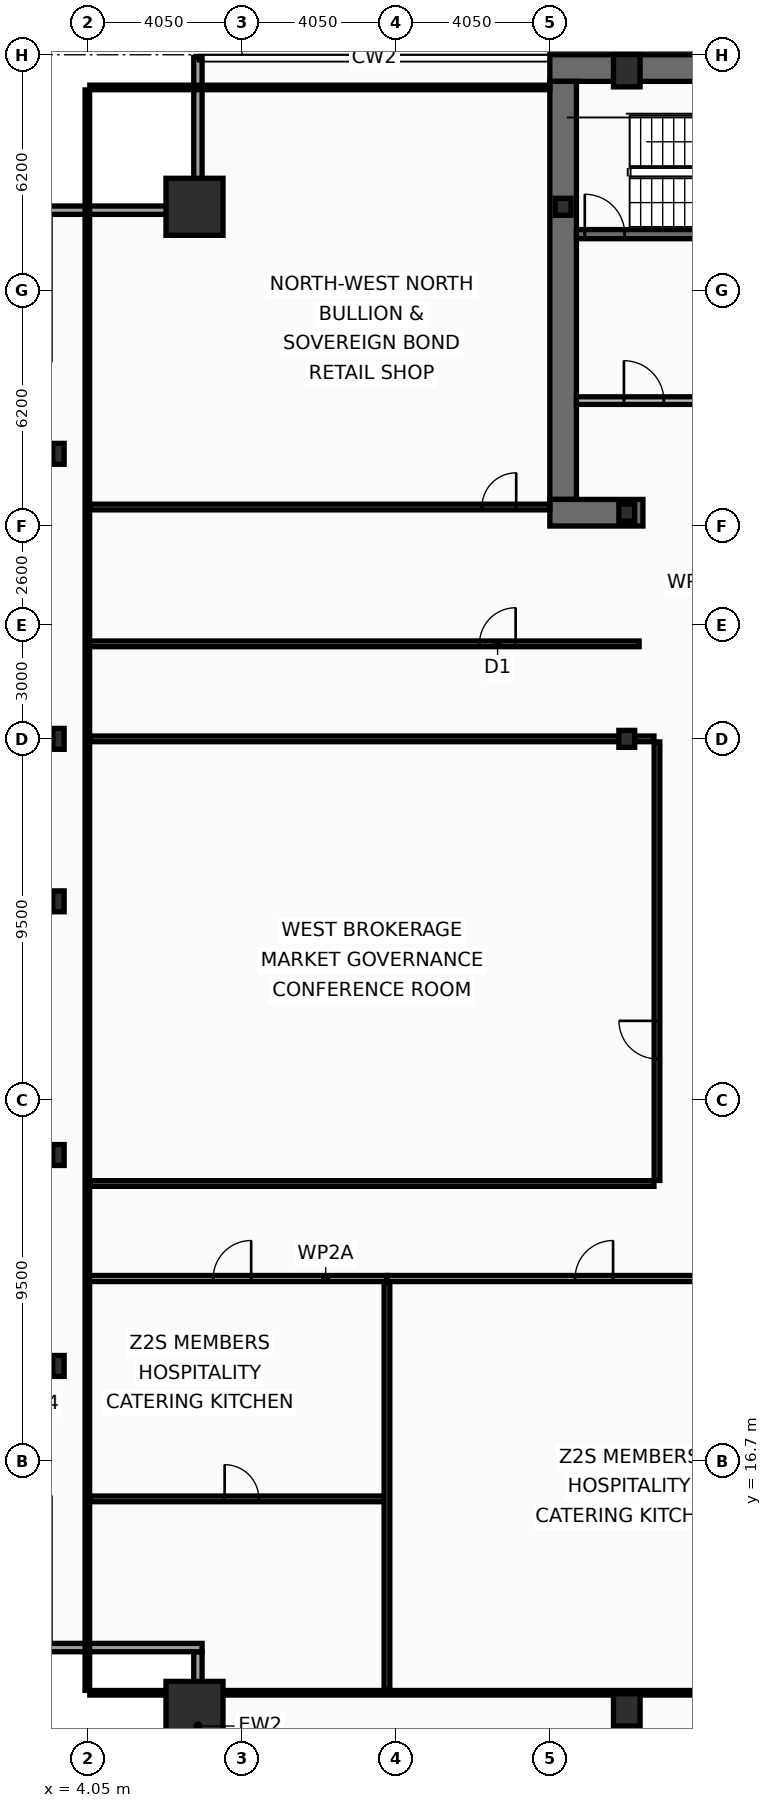
"""IFC4 building model, lengths in metres.
Left out: names, types, materials, properties, quantities, classifications, styles, units other than length and angle.
Written with IfcOpenShell. Run it as: python <this file> out.ifc"""

import sys

from ifc_helpers import new_model, si_unit, direction, frame, frame_2d, origin, origin_2d, place, context, subcontext, project, spatial, rectangle, hollow_rectangle, i_section, extrude, element, fill, save


model = new_model("IFC4")
c1 = context("Model", 3, precision=1e-05, world=origin(), true_north=direction((0.0, 1.0)))
c2 = subcontext(c1, "Body", "Model", "MODEL_VIEW")
j1 = project(units=[si_unit("LENGTHUNIT", "METRE"), si_unit("PLANEANGLEUNIT", "RADIAN")], contexts=[c1])
p1 = place(None, origin())
s1 = spatial("IfcSite", under=j1, at=p1, CompositionType="ELEMENT")
p2 = place(p1, origin())
s2 = spatial("IfcBuilding", under=s1, at=p2, CompositionType="ELEMENT")
p3 = place(p2, frame((0.0, 0.0, 129.0)))
s3 = spatial("IfcBuildingStorey", under=s2, at=p3, CompositionType="ELEMENT", Elevation=129.0)
p4 = place(p3, frame((16.2, 53.35, 0.0), z_axis=(0.0, 0.0, 1.0), x_axis=(1.0, 0.0, 0.0)))
e1 = element("IfcWall", 1, at=p4, inside=s3, PredefinedType="SHEAR", context=c2, shape_type="SweptSolid", body=[
    extrude(rectangle(XDim=40.5, YDim=0.7, at=frame_2d((20.25, 0.0))), origin(), (0.0, 0.0, 1.0), 3.44),
])
p5 = place(p3, frame((16.55, 42.0, 0.0), z_axis=(0.0, 0.0, 1.0), x_axis=(0.0, 1.0, 0.0)))
e2 = element("IfcWall", 2, at=p5, inside=s3, PredefinedType="SHEAR", context=c2, shape_type="SweptSolid", body=[
    extrude(rectangle(XDim=11.0, YDim=0.7, at=frame_2d((5.5, 0.0))), origin(), (0.0, 0.0, 1.0), 3.44),
])
p6 = place(p3, frame((18.65, 41.65, 0.0), z_axis=(0.0, 0.0, 1.0), x_axis=(-1.0, 0.0, 0.0)))
e3 = element("IfcWall", 3, at=p6, inside=s3, PredefinedType="SHEAR", context=c2, shape_type="SweptSolid", body=[
    extrude(rectangle(XDim=2.45, YDim=0.7, at=frame_2d((1.225, 0.0))), origin(), (0.0, 0.0, 1.0), 3.44),
])
p7 = place(p3, frame((16.9, 48.98, 0.0), z_axis=(0.0, 0.0, 1.0), x_axis=(1.0, 0.0, 0.0)))
e4 = element("IfcWall", 4, at=p7, inside=s3, PredefinedType="SHEAR", context=c2, shape_type="SweptSolid", body=[
    extrude(rectangle(XDim=7.32, YDim=0.24, at=frame_2d((3.66, 0.0))), origin(), (0.0, 0.0, 1.0), 3.44),
])
p8 = place(p7, frame((0.22, 0.0, 0.0)))
e5 = element("IfcOpeningElement", 5, at=p8, cuts=e4, PredefinedType="OPENING", context=c2, shape_type="SweptSolid", body=[
    extrude(rectangle(XDim=1.05, YDim=2.15, at=frame_2d((0.525, 1.075))), frame((0.0, 0.13, 0.0), z_axis=(0.0, -1.0, 0.0), x_axis=(1.0, 0.0, 0.0)), (0.0, 0.0, 1.0), 0.26),
])
for number, where, z_axis, x_axis in (
    (6, (6.85, 10.15, 0.0), (0.0, 0.0, 1.0), (1.0, 0.0, 0.0)),
    (7, (6.85, 49.7, 0.0), (0.0, 0.0, 1.0), (1.0, 0.0, 0.0)),
):
    element("IfcColumn", number, at=place(p3, frame(where, z_axis=z_axis, x_axis=x_axis)), inside=s3, PredefinedType="COLUMN", context=c2, shape_type="SweptSolid", body=[
        extrude(hollow_rectangle(XDim=1.5, YDim=1.5, WallThickness=0.07, at=origin_2d()), origin(), (0.0, 0.0, 1.0), 3.6),
    ])
for number, where, z_axis, x_axis in (
    (8, (18.225, 10.15, 0.0), (0.0, 0.0, 1.0), (1.0, 0.0, 0.0)),
    (9, (18.225, 53.28, 0.0), (0.0, 0.0, 1.0), (1.0, 0.0, 0.0)),
):
    element("IfcColumn", number, at=place(p3, frame(where, z_axis=z_axis, x_axis=x_axis)), inside=s3, PredefinedType="COLUMN", context=c2, shape_type="SweptSolid", body=[
        extrude(hollow_rectangle(XDim=0.7, YDim=0.85, WallThickness=0.05, at=origin_2d()), origin(), (0.0, 0.0, 1.0), 3.6),
    ])
for number, where, z_axis, x_axis in (
    (10, (3.27, 19.2, 0.0), (0.0, 0.0, 1.0), (1.0, 0.0, 0.0)),
    (11, (3.27, 24.75, 0.0), (0.0, 0.0, 1.0), (1.0, 0.0, 0.0)),
    (12, (3.27, 31.425, 0.0), (0.0, 0.0, 1.0), (1.0, 0.0, 0.0)),
    (13, (3.27, 35.7, 0.0), (0.0, 0.0, 1.0), (1.0, 0.0, 0.0)),
    (14, (3.27, 43.2, 0.0), (0.0, 0.0, 1.0), (1.0, 0.0, 0.0)),
):
    element("IfcColumn", number, at=place(p3, frame(where, z_axis=z_axis, x_axis=x_axis)), inside=s3, PredefinedType="COLUMN", context=c2, shape_type="SweptSolid", body=[
        extrude(i_section(OverallWidth=0.3, OverallDepth=0.55, WebThickness=0.015, FlangeThickness=0.029, at=origin_2d()), origin(), (0.0, 0.0, 1.0), 3.6),
    ])
for number, where, z_axis, x_axis in (
    (15, (16.55, 49.7, 0.0), (0.0, 0.0, 1.0), (1.0, 0.0, 0.0)),
    (16, (18.225, 35.7, 0.0), (0.0, 0.0, 1.0), (1.0, 0.0, 0.0)),
    (17, (18.225, 41.65, 0.0), (0.0, 0.0, 1.0), (1.0, 0.0, 0.0)),
):
    element("IfcColumn", number, at=place(p3, frame(where, z_axis=z_axis, x_axis=x_axis)), inside=s3, PredefinedType="COLUMN", context=c2, shape_type="SweptSolid", body=[
        extrude(i_section(OverallWidth=0.416, OverallDepth=0.446, WebThickness=0.039, FlangeThickness=0.063, at=origin_2d()), origin(), (0.0, 0.0, 1.0), 3.6),
    ])
p9 = place(p3, frame((6.94, 7.77, 0.0), z_axis=(0.0, 0.0, 1.0), x_axis=(0.0, 1.0, 0.0)))
e18 = element("IfcWall", 18, at=p9, inside=s3, PredefinedType="SOLIDWALL", context=c2, shape_type="SweptSolid", body=[
    extrude(rectangle(XDim=3.91, YDim=0.22, at=frame_2d((1.955, 0.0))), origin(), (0.0, 0.0, 1.0), 2.83),
])
for number, where, z_axis, x_axis in (
    (19, (7.05, 11.79, 0.0), (0.0, 0.0, 1.0), (-1.0, 0.0, 0.0)),
    (20, (2.83, 49.61, 0.0), (0.0, 0.0, 1.0), (1.0, 0.0, 0.0)),
):
    element("IfcWall", number, at=place(p3, frame(where, z_axis=z_axis, x_axis=x_axis)), inside=s3, PredefinedType="SOLIDWALL", context=c2, shape_type="SweptSolid", body=[
        extrude(rectangle(XDim=4.22, YDim=0.22, at=frame_2d((2.11, 0.0))), origin(), (0.0, 0.0, 1.0), 2.83),
    ])
p10 = place(p3, frame((6.94, 49.72, 0.0), z_axis=(0.0, 0.0, 1.0), x_axis=(0.0, 1.0, 0.0)))
e21 = element("IfcWall", 21, at=p10, inside=s3, PredefinedType="SOLIDWALL", context=c2, shape_type="SweptSolid", body=[
    extrude(rectangle(XDim=3.91, YDim=0.22, at=frame_2d((1.955, 0.0))), origin(), (0.0, 0.0, 1.0), 2.83),
])
p11 = place(p3, frame((16.9, 44.6, 0.0), z_axis=(0.0, 0.0, 1.0), x_axis=(1.0, 0.0, 0.0)))
e22 = element("IfcWall", 22, at=p11, inside=s3, PredefinedType="PARTITIONING", context=c2, shape_type="SweptSolid", body=[
    extrude(rectangle(XDim=4.1, YDim=0.2, at=frame_2d((2.05, 0.0))), origin(), (0.0, 0.0, 1.0), 3.44),
])
p12 = place(p11, frame((1.25, 0.0, 0.0)))
e23 = element("IfcOpeningElement", 23, at=p12, cuts=e22, PredefinedType="OPENING", context=c2, shape_type="SweptSolid", body=[
    extrude(rectangle(XDim=1.05, YDim=2.15, at=frame_2d((0.525, 1.075))), frame((0.0, 0.11, 0.0), z_axis=(0.0, -1.0, 0.0), x_axis=(1.0, 0.0, 0.0)), (0.0, 0.0, 1.0), 0.22),
])
p13 = place(p3, frame((4.03, 38.2, 0.0), z_axis=(0.0, 0.0, 1.0), x_axis=(1.0, 0.0, 0.0)))
e24 = element("IfcWall", 24, at=p13, inside=s3, PredefinedType="PARTITIONING", context=c2, shape_type="SweptSolid", body=[
    extrude(rectangle(XDim=14.52, YDim=0.15, at=frame_2d((7.26, 0.0))), origin(), (0.0, 0.0, 1.0), 2.73),
])
p14 = place(p13, frame((10.32, 0.0, 0.0)))
e25 = element("IfcOpeningElement", 25, at=p14, cuts=e24, PredefinedType="OPENING", context=c2, shape_type="SweptSolid", body=[
    extrude(rectangle(XDim=0.95, YDim=2.05, at=frame_2d((0.475, 1.025))), frame((0.0, 0.085, 0.0), z_axis=(0.0, -1.0, 0.0), x_axis=(1.0, 0.0, 0.0)), (0.0, 0.0, 1.0), 0.17),
])
p15 = place(p3, frame((4.095, 41.8, 0.0), z_axis=(0.0, 0.0, 1.0), x_axis=(1.0, 0.0, 0.0)))
e26 = element("IfcWall", 26, at=p15, inside=s3, PredefinedType="PARTITIONING", context=c2, shape_type="SweptSolid", body=[
    extrude(rectangle(XDim=12.105, YDim=0.15, at=frame_2d((6.052, 0.0))), origin(), (0.0, 0.0, 1.0), 3.44),
])
p16 = place(p15, frame((10.32, 0.0, 0.0)))
e27 = element("IfcOpeningElement", 27, at=p16, cuts=e26, PredefinedType="OPENING", context=c2, shape_type="SweptSolid", body=[
    extrude(rectangle(XDim=0.9, YDim=2.05, at=frame_2d((0.45, 1.025))), frame((0.0, 0.085, 0.0), z_axis=(0.0, -1.0, 0.0), x_axis=(1.0, 0.0, 0.0)), (0.0, 0.0, 1.0), 0.17),
])
p17 = place(p3, frame((4.03, 21.5, 0.0), z_axis=(0.0, 0.0, 1.0), x_axis=(1.0, 0.0, 0.0)))
e28 = element("IfcWall", 28, at=p17, inside=s3, PredefinedType="PARTITIONING", context=c2, shape_type="SweptSolid", body=[
    extrude(rectangle(XDim=7.884, YDim=0.16, at=frame_2d((3.942, 0.0))), origin(), (0.0, 0.0, 1.0), 3.44),
])
p18 = place(p17, frame((3.311, 0.0, 0.0)))
e29 = element("IfcOpeningElement", 29, at=p18, cuts=e28, PredefinedType="OPENING", context=c2, shape_type="SweptSolid", body=[
    extrude(rectangle(XDim=1.0, YDim=2.05, at=frame_2d((0.5, 1.025))), frame((0.0, 0.09, 0.0), z_axis=(0.0, -1.0, 0.0), x_axis=(1.0, 0.0, 0.0)), (0.0, 0.0, 1.0), 0.18),
])
p19 = place(p3, frame((4.095, 15.702, 0.0), z_axis=(0.0, 0.0, 1.0), x_axis=(1.0, 0.0, 0.0)))
e30 = element("IfcWall", 30, at=p19, inside=s3, PredefinedType="PARTITIONING", context=c2, shape_type="SweptSolid", body=[
    extrude(rectangle(XDim=7.739, YDim=0.15, at=frame_2d((3.87, 0.0))), origin(), (0.0, 0.0, 1.0), 2.83),
])
p20 = place(p19, frame((3.548, 0.0, 0.0)))
e31 = element("IfcOpeningElement", 31, at=p20, cuts=e30, PredefinedType="OPENING", context=c2, shape_type="SweptSolid", body=[
    extrude(rectangle(XDim=0.9, YDim=2.05, at=frame_2d((0.45, 1.025))), frame((0.0, 0.085, 0.0), z_axis=(0.0, -1.0, 0.0), x_axis=(1.0, 0.0, 0.0)), (0.0, 0.0, 1.0), 0.17),
])
p21 = place(p3, frame((11.914, 21.5, 0.0), z_axis=(0.0, 0.0, 1.0), x_axis=(1.0, 0.0, 0.0)))
e32 = element("IfcWall", 32, at=p21, inside=s3, PredefinedType="PARTITIONING", context=c2, shape_type="SweptSolid", body=[
    extrude(rectangle(XDim=11.787, YDim=0.16, at=frame_2d((5.893, 0.0))), origin(), (0.0, 0.0, 1.0), 2.73),
])
p22 = place(p21, frame((4.95, 0.0, 0.0)))
e33 = element("IfcOpeningElement", 33, at=p22, cuts=e32, PredefinedType="OPENING", context=c2, shape_type="SweptSolid", body=[
    extrude(rectangle(XDim=1.0, YDim=2.05, at=frame_2d((0.5, 1.025))), frame((0.0, 0.09, 0.0), z_axis=(0.0, -1.0, 0.0), x_axis=(1.0, 0.0, 0.0)), (0.0, 0.0, 1.0), 0.18),
])
p23 = place(p3, frame((11.914, 10.665, 0.0), z_axis=(0.0, 0.0, 1.0), x_axis=(0.0, 1.0, 0.0)))
e34 = element("IfcWall", 34, at=p23, inside=s3, PredefinedType="PARTITIONING", context=c2, shape_type="SweptSolid", body=[
    extrude(rectangle(XDim=10.75, YDim=0.15, at=frame_2d((5.375, 0.0))), origin(), (0.0, 0.0, 1.0), 2.73),
])
p24 = place(p3, frame((19.02, 24.08, 0.0), z_axis=(0.0, 0.0, 1.0), x_axis=(0.0, 1.0, 0.0)))
e35 = element("IfcWall", 35, at=p24, inside=s3, PredefinedType="PARTITIONING", context=c2, shape_type="SweptSolid", body=[
    extrude(rectangle(XDim=11.54, YDim=0.15, at=frame_2d((5.77, 0.0))), origin(), (0.0, 0.0, 1.0), 2.88),
])
p25 = place(p24, frame((3.2, 0.0, 0.0)))
e36 = element("IfcOpeningElement", 36, at=p25, cuts=e35, PredefinedType="OPENING", context=c2, shape_type="SweptSolid", body=[
    extrude(rectangle(XDim=1.0, YDim=2.05, at=frame_2d((0.5, 1.025))), frame((0.0, 0.085, 0.0), z_axis=(0.0, -1.0, 0.0), x_axis=(1.0, 0.0, 0.0)), (0.0, 0.0, 1.0), 0.17),
])
for number, where, z_axis, x_axis in (
    (37, (4.095, 24.0, 0.0), (0.0, 0.0, 1.0), (1.0, 0.0, 0.0)),
    (38, (4.095, 35.7, 0.0), (0.0, 0.0, 1.0), (1.0, 0.0, 0.0)),
):
    element("IfcWall", number, at=place(p3, frame(where, z_axis=z_axis, x_axis=x_axis)), inside=s3, PredefinedType="PARTITIONING", context=c2, shape_type="SweptSolid", body=[
        extrude(rectangle(XDim=14.845, YDim=0.15, at=frame_2d((7.422, 0.0))), origin(), (0.0, 0.0, 1.0), 2.73),
    ])
p26 = place(p3, frame((4.03, 10.665, 0.0), z_axis=(0.0, 0.0, 1.0), x_axis=(0.0, 1.0, 0.0)))
e39 = element("IfcWall", 39, at=p26, inside=s3, PredefinedType="PARTITIONING", context=c2, shape_type="SweptSolid", body=[
    extrude(rectangle(XDim=42.11, YDim=0.12, at=frame_2d((21.055, 0.0))), origin(), (0.0, 0.0, 1.0), 2.73),
])
p27 = place(p3, frame((4.095, 52.84, 0.0), z_axis=(0.0, 0.0, 1.0), x_axis=(1.0, 0.0, 0.0)))
e40 = element("IfcWall", 40, at=p27, inside=s3, PredefinedType="PARTITIONING", context=c2, shape_type="SweptSolid", body=[
    extrude(rectangle(XDim=12.105, YDim=0.12, at=frame_2d((6.052, 0.0))), origin(), (0.0, 0.0, 1.0), 3.44),
])
p28 = place(p3, frame((4.095, 10.6, 0.0), z_axis=(0.0, 0.0, 1.0), x_axis=(1.0, 0.0, 0.0)))
e41 = element("IfcWall", 41, at=p28, inside=s3, PredefinedType="PARTITIONING", context=c2, shape_type="SweptSolid", body=[
    extrude(rectangle(XDim=64.71, YDim=0.12, at=frame_2d((32.355, 0.0))), origin(), (0.0, 0.0, 1.0), 2.73),
])
p29 = place(p8, origin())
e42 = element("IfcDoor", 42, at=p29, inside=s3, OperationType="SINGLE_SWING_LEFT", PredefinedType="DOOR", context=c2, shape_type="SweptSolid", body=[
    extrude(rectangle(XDim=1.05, YDim=2.15, at=frame_2d((0.525, 1.075))), frame((0.0, 0.025, 0.0), z_axis=(0.0, -1.0, 0.0), x_axis=(1.0, 0.0, 0.0)), (0.0, 0.0, 1.0), 0.05),
])
fill(e5, e42)
p30 = place(p12, origin())
e43 = element("IfcDoor", 43, at=p30, inside=s3, OperationType="SINGLE_SWING_LEFT", PredefinedType="DOOR", context=c2, shape_type="SweptSolid", body=[
    extrude(rectangle(XDim=1.05, YDim=2.15, at=frame_2d((0.525, 1.075))), frame((0.0, 0.025, 0.0), z_axis=(0.0, -1.0, 0.0), x_axis=(1.0, 0.0, 0.0)), (0.0, 0.0, 1.0), 0.05),
])
fill(e23, e43)
p31 = place(p14, origin())
e44 = element("IfcDoor", 44, at=p31, inside=s3, OperationType="SINGLE_SWING_RIGHT", PredefinedType="DOOR", context=c2, shape_type="SweptSolid", body=[
    extrude(rectangle(XDim=0.95, YDim=2.05, at=frame_2d((0.475, 1.025))), frame((0.0, 0.025, 0.0), z_axis=(0.0, -1.0, 0.0), x_axis=(1.0, 0.0, 0.0)), (0.0, 0.0, 1.0), 0.05),
])
fill(e25, e44)
p32 = place(p16, origin())
e45 = element("IfcDoor", 45, at=p32, inside=s3, OperationType="SINGLE_SWING_RIGHT", PredefinedType="DOOR", context=c2, shape_type="SweptSolid", body=[
    extrude(rectangle(XDim=0.9, YDim=2.05, at=frame_2d((0.45, 1.025))), frame((0.0, 0.025, 0.0), z_axis=(0.0, -1.0, 0.0), x_axis=(1.0, 0.0, 0.0)), (0.0, 0.0, 1.0), 0.05),
])
fill(e27, e45)
p33 = place(p18, origin())
e46 = element("IfcDoor", 46, at=p33, inside=s3, OperationType="SINGLE_SWING_RIGHT", PredefinedType="DOOR", context=c2, shape_type="SweptSolid", body=[
    extrude(rectangle(XDim=1.0, YDim=2.05, at=frame_2d((0.5, 1.025))), frame((0.0, 0.025, 0.0), z_axis=(0.0, -1.0, 0.0), x_axis=(1.0, 0.0, 0.0)), (0.0, 0.0, 1.0), 0.05),
])
fill(e29, e46)
p34 = place(p20, origin())
e47 = element("IfcDoor", 47, at=p34, inside=s3, OperationType="SINGLE_SWING_LEFT", PredefinedType="DOOR", context=c2, shape_type="SweptSolid", body=[
    extrude(rectangle(XDim=0.9, YDim=2.05, at=frame_2d((0.45, 1.025))), frame((0.0, 0.025, 0.0), z_axis=(0.0, -1.0, 0.0), x_axis=(1.0, 0.0, 0.0)), (0.0, 0.0, 1.0), 0.05),
])
fill(e31, e47)
p35 = place(p22, origin())
e48 = element("IfcDoor", 48, at=p35, inside=s3, OperationType="SINGLE_SWING_RIGHT", PredefinedType="DOOR", context=c2, shape_type="SweptSolid", body=[
    extrude(rectangle(XDim=1.0, YDim=2.05, at=frame_2d((0.5, 1.025))), frame((0.0, 0.025, 0.0), z_axis=(0.0, -1.0, 0.0), x_axis=(1.0, 0.0, 0.0)), (0.0, 0.0, 1.0), 0.05),
])
fill(e33, e48)
p36 = place(p25, origin())
e49 = element("IfcDoor", 49, at=p36, inside=s3, OperationType="SINGLE_SWING_RIGHT", PredefinedType="DOOR", context=c2, shape_type="SweptSolid", body=[
    extrude(rectangle(XDim=1.0, YDim=2.05, at=frame_2d((0.5, 1.025))), frame((0.0, 0.025, 0.0), z_axis=(0.0, -1.0, 0.0), x_axis=(1.0, 0.0, 0.0)), (0.0, 0.0, 1.0), 0.05),
])
fill(e36, e49)
save(model, sys.argv[1])
